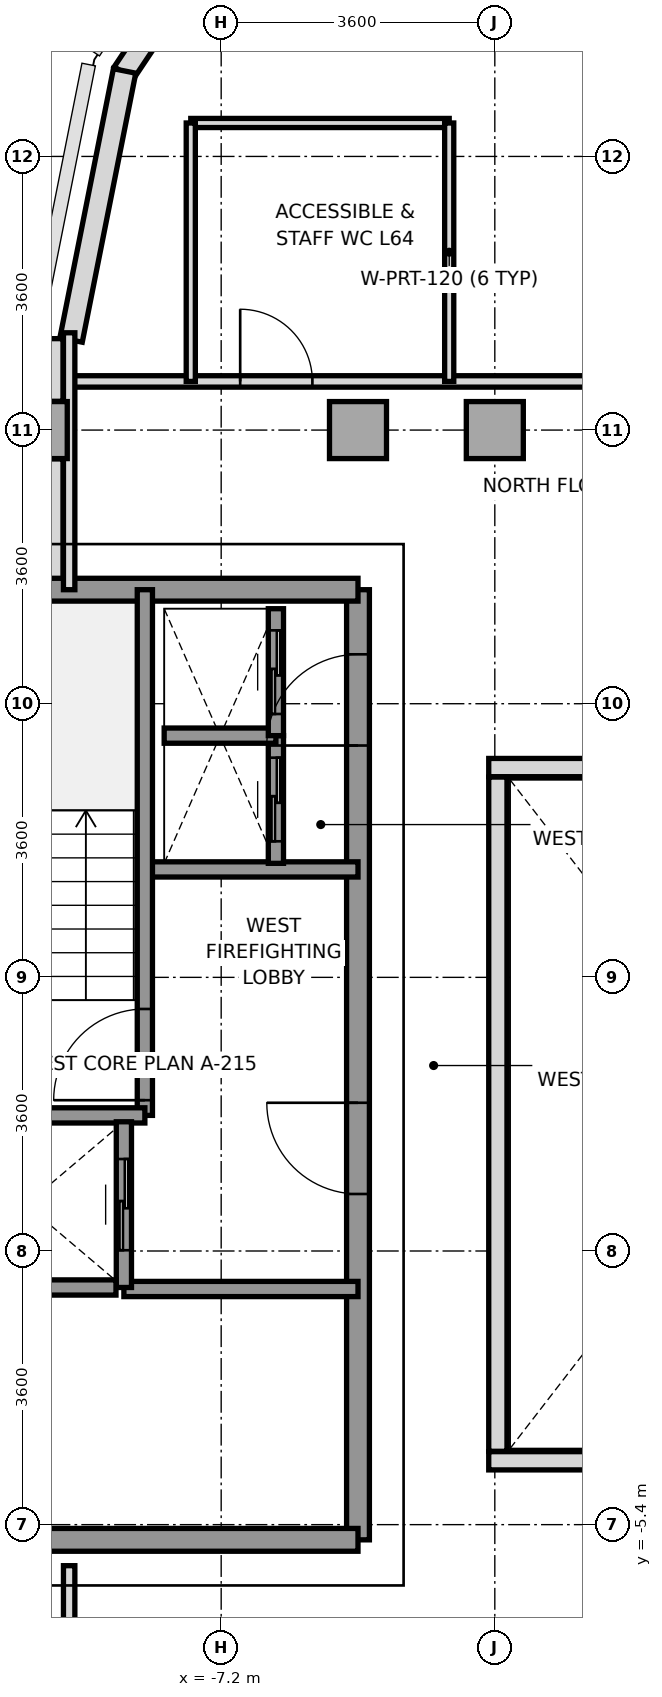
"""IFC4 building model, lengths in metres.
Left out: names, types, materials, properties, quantities, classifications, styles, units other than length and angle.
Written with IfcOpenShell. Run it as: python <this file> out.ifc"""

import sys

from ifc_helpers import new_model, si_unit, direction, frame, frame_2d, origin, origin_2d, place, context, subcontext, project, spatial, rectangle, extrude, source, transform, mapped, element, fill, save


model = new_model("IFC4")
c1 = context("Model", 3, precision=1e-05, world=origin(), true_north=direction((0.0, 1.0)))
c2 = subcontext(c1, "Body", "Model", "MODEL_VIEW")
j1 = project(units=[si_unit("LENGTHUNIT", "METRE"), si_unit("PLANEANGLEUNIT", "RADIAN")], contexts=[c1])
p1 = place(None, origin())
s1 = spatial("IfcSite", under=j1, at=p1, CompositionType="ELEMENT")
p2 = place(p1, origin())
s2 = spatial("IfcBuilding", under=s1, at=p2, CompositionType="ELEMENT")
p3 = place(p2, frame((0.0, 0.0, 233.2)))
s3 = spatial("IfcBuildingStorey", under=s2, at=p3, CompositionType="ELEMENT", Elevation=233.2)
m1 = source(origin(), c2, "Body", "SweptSolid", [
    extrude(rectangle(XDim=0.75, YDim=0.75, at=origin_2d()), origin(), (0.0, 0.0, 1.0), 3.01),
])
for number, where, z_axis, x_axis in (
    (1, (-9.6, 9.0, 0.0), (0.0, 0.0, 1.0), (1.0, 0.0, 0.0)),
    (2, (-5.4, 9.0, 0.0), (0.0, 0.0, 1.0), (1.0, 0.0, 0.0)),
    (3, (-3.6, 9.0, 0.0), (0.0, 0.0, 1.0), (1.0, 0.0, 0.0)),
):
    element("IfcColumn", number, at=place(p3, frame(where, z_axis=z_axis, x_axis=x_axis)), inside=s3, PredefinedType="COLUMN", context=c2, shape_type="MappedRepresentation", body=[
        mapped(m1, transform((0.0, 0.0, 0.0), x_axis=(1.0, 0.0, 0.0), y_axis=(0.0, 1.0, 0.0), z_axis=(0.0, 0.0, 1.0), scale=1.0)),
    ])
p4 = place(p3, frame((-7.305, 15.458, 0.0), z_axis=(0.0, 0.0, 1.0), x_axis=(-0.555604299396, -0.831446848868, 0.0)))
e4 = element("IfcWall", 4, at=p4, inside=s3, PredefinedType="SOLIDWALL", context=c2, shape_type="SweptSolid", body=[
    extrude(rectangle(XDim=2.118, YDim=0.3, at=frame_2d((1.059, 0.0))), origin(), (0.0, 0.0, 1.0), 2.61),
])
p5 = place(p3, frame((-8.471, 13.725, 0.0), z_axis=(0.0, 0.0, 1.0), x_axis=(-0.195114232679, -0.980780523974, 0.0)))
e5 = element("IfcWall", 5, at=p5, inside=s3, PredefinedType="SOLIDWALL", context=c2, shape_type="SweptSolid", body=[
    extrude(rectangle(XDim=3.609, YDim=0.3, at=frame_2d((1.804, 0.0))), origin(), (0.0, 0.0, 1.0), 3.01),
])
p6 = place(p3, frame((-9.4, 6.953, 0.0), z_axis=(0.0, 0.0, 1.0), x_axis=(0.0, 1.0, 0.0)))
e6 = element("IfcWall", 6, at=p6, inside=s3, PredefinedType="PARAPET", context=c2, shape_type="SweptSolid", body=[
    extrude(rectangle(XDim=1.669, YDim=0.24, at=frame_2d((0.834, 0.0))), origin(), (0.0, 0.0, 1.0), 1.15),
])
p7 = place(p3, frame((-9.4, 9.378, 0.0), z_axis=(0.0, 0.0, 1.0), x_axis=(0.0, 1.0, 0.0)))
e7 = element("IfcWall", 7, at=p7, inside=s3, PredefinedType="PARAPET", context=c2, shape_type="SweptSolid", body=[
    extrude(rectangle(XDim=0.825, YDim=0.24, at=frame_2d((0.413, 0.0))), origin(), (0.0, 0.0, 1.0), 1.15),
])
p8 = place(p3, frame((-5.4, -5.6, 0.0), z_axis=(0.0, 0.0, 1.0), x_axis=(0.0, 1.0, 0.0)))
e8 = element("IfcWall", 8, at=p8, inside=s3, PredefinedType="SHEAR", context=c2, shape_type="SweptSolid", body=[
    extrude(rectangle(XDim=12.5, YDim=0.3, at=frame_2d((6.25, 0.0))), origin(), (0.0, 0.0, 1.0), 3.01),
])
p9 = place(p8, frame((4.55, 0.0, 0.0)))
e9 = element("IfcOpeningElement", 9, at=p9, cuts=e8, PredefinedType="OPENING", context=c2, shape_type="SweptSolid", body=[
    extrude(rectangle(XDim=1.2, YDim=2.2, at=frame_2d((0.6, 1.1))), frame((0.0, 0.16, 0.0), z_axis=(0.0, -1.0, 0.0), x_axis=(1.0, 0.0, 0.0)), (0.0, 0.0, 1.0), 0.32),
])
p10 = place(p8, frame((10.45, 0.0, 0.0)))
e10 = element("IfcOpeningElement", 10, at=p10, cuts=e8, PredefinedType="OPENING", context=c2, shape_type="SweptSolid", body=[
    extrude(rectangle(XDim=1.2, YDim=2.2, at=frame_2d((0.6, 1.1))), frame((0.0, 0.16, 0.0), z_axis=(0.0, -1.0, 0.0), x_axis=(1.0, 0.0, 0.0)), (0.0, 0.0, 1.0), 0.32),
])
p11 = place(p3, frame((-11.356, 6.9, 0.0), z_axis=(0.0, 0.0, 1.0), x_axis=(1.0, 0.0, 0.0)))
e11 = element("IfcWall", 11, at=p11, inside=s3, PredefinedType="SHEAR", context=c2, shape_type="SweptSolid", body=[
    extrude(rectangle(XDim=5.956, YDim=0.3, at=frame_2d((2.978, 0.0))), origin(), (0.0, 0.0, 1.0), 3.01),
])
p12 = place(p3, frame((-13.2, -5.6, 0.0), z_axis=(0.0, 0.0, 1.0), x_axis=(1.0, 0.0, 0.0)))
e12 = element("IfcWall", 12, at=p12, inside=s3, PredefinedType="SHEAR", context=c2, shape_type="SweptSolid", body=[
    extrude(rectangle(XDim=7.8, YDim=0.3, at=frame_2d((3.9, 0.0))), origin(), (0.0, 0.0, 1.0), 3.01),
])
p13 = place(p3, frame((-8.18, 3.22, 0.0), z_axis=(0.0, 0.0, 1.0), x_axis=(1.0, 0.0, 0.0)))
e13 = element("IfcWall", 13, at=p13, inside=s3, PredefinedType="SOLIDWALL", context=c2, shape_type="SweptSolid", body=[
    extrude(rectangle(XDim=2.78, YDim=0.2, at=frame_2d((1.39, 0.0))), origin(), (0.0, 0.0, 1.0), 3.01),
])
p14 = place(p3, frame((-8.48, -2.3, 0.0), z_axis=(0.0, 0.0, 1.0), x_axis=(1.0, 0.0, 0.0)))
e14 = element("IfcWall", 14, at=p14, inside=s3, PredefinedType="SOLIDWALL", context=c2, shape_type="SweptSolid", body=[
    extrude(rectangle(XDim=3.08, YDim=0.2, at=frame_2d((1.54, 0.0))), origin(), (0.0, 0.0, 1.0), 3.01),
])
p15 = place(p3, frame((-8.204, -0.016, 0.0), z_axis=(0.0, 0.0, 1.0), x_axis=(0.0, 1.0, 0.0)))
e15 = element("IfcWall", 15, at=p15, inside=s3, PredefinedType="SOLIDWALL", context=c2, shape_type="SweptSolid", body=[
    extrude(rectangle(XDim=6.916, YDim=0.2, at=frame_2d((3.458, 0.0))), origin(), (0.0, 0.0, 1.0), 3.01),
])
p16 = place(p15, frame((0.2, 0.0, 0.0)))
e16 = element("IfcOpeningElement", 16, at=p16, cuts=e15, PredefinedType="OPENING", context=c2, shape_type="SweptSolid", body=[
    extrude(rectangle(XDim=1.2, YDim=2.2, at=frame_2d((0.6, 1.1))), frame((0.0, 0.11, 0.0), z_axis=(0.0, -1.0, 0.0), x_axis=(1.0, 0.0, 0.0)), (0.0, 0.0, 1.0), 0.22),
])
p17 = place(p3, frame((-11.356, -0.016, 0.0), z_axis=(0.0, 0.0, 1.0), x_axis=(1.0, 0.0, 0.0)))
e17 = element("IfcWall", 17, at=p17, inside=s3, PredefinedType="SOLIDWALL", context=c2, shape_type="SweptSolid", body=[
    extrude(rectangle(XDim=3.152, YDim=0.2, at=frame_2d((1.576, 0.0))), origin(), (0.0, 0.0, 1.0), 3.01),
])
p18 = place(p3, frame((-8.48, -2.28, 0.0), z_axis=(0.0, 0.0, 1.0), x_axis=(0.0, 1.0, 0.0)))
e18 = element("IfcWall", 18, at=p18, inside=s3, PredefinedType="SOLIDWALL", context=c2, shape_type="SweptSolid", body=[
    extrude(rectangle(XDim=2.18, YDim=0.2, at=frame_2d((1.09, 0.0))), origin(), (0.0, 0.0, 1.0), 3.01),
])
p19 = place(p18, frame((0.49, 0.0, 0.0)))
e19 = element("IfcOpeningElement", 19, at=p19, cuts=e18, PredefinedType="OPENING", context=c2, shape_type="SweptSolid", body=[
    extrude(rectangle(XDim=1.2, YDim=2.2, at=frame_2d((0.6, 1.1))), frame((0.0, 0.11, 0.0), z_axis=(0.0, -1.0, 0.0), x_axis=(1.0, 0.0, 0.0)), (0.0, 0.0, 1.0), 0.22),
])
p20 = place(p3, frame((-10.946, -2.28, 0.0), z_axis=(0.0, 0.0, 1.0), x_axis=(1.0, 0.0, 0.0)))
e20 = element("IfcWall", 20, at=p20, inside=s3, PredefinedType="SOLIDWALL", context=c2, shape_type="SweptSolid", body=[
    extrude(rectangle(XDim=2.362, YDim=0.2, at=frame_2d((1.181, 0.0))), origin(), (0.0, 0.0, 1.0), 3.01),
])
p21 = place(p3, frame((-6.48, 3.3, 0.0), z_axis=(0.0, 0.0, 1.0), x_axis=(0.0, 1.0, 0.0)))
e21 = element("IfcWall", 21, at=p21, inside=s3, PredefinedType="SOLIDWALL", context=c2, shape_type="SweptSolid", body=[
    extrude(rectangle(XDim=1.68, YDim=0.2, at=frame_2d((0.84, 0.0))), origin(), (0.0, 0.0, 1.0), 3.01),
])
p22 = place(p21, frame((0.29, 0.0, 0.0)))
e22 = element("IfcOpeningElement", 22, at=p22, cuts=e21, PredefinedType="OPENING", context=c2, shape_type="SweptSolid", body=[
    extrude(rectangle(XDim=1.1, YDim=2.2, at=frame_2d((0.55, 1.1))), frame((0.0, 0.11, 0.0), z_axis=(0.0, -1.0, 0.0), x_axis=(1.0, 0.0, 0.0)), (0.0, 0.0, 1.0), 0.22),
])
p23 = place(p3, frame((-7.95, 4.98, 0.0), z_axis=(0.0, 0.0, 1.0), x_axis=(1.0, 0.0, 0.0)))
e23 = element("IfcWall", 23, at=p23, inside=s3, PredefinedType="SOLIDWALL", context=c2, shape_type="SweptSolid", body=[
    extrude(rectangle(XDim=1.47, YDim=0.2, at=frame_2d((0.735, 0.0))), origin(), (0.0, 0.0, 1.0), 3.01),
])
p24 = place(p3, frame((-6.48, 4.98, 0.0), z_axis=(0.0, 0.0, 1.0), x_axis=(0.0, 1.0, 0.0)))
e24 = element("IfcWall", 24, at=p24, inside=s3, PredefinedType="SOLIDWALL", context=c2, shape_type="SweptSolid", body=[
    extrude(rectangle(XDim=1.67, YDim=0.2, at=frame_2d((0.835, 0.0))), origin(), (0.0, 0.0, 1.0), 3.01),
])
p25 = place(p24, frame((0.285, 0.0, 0.0)))
e25 = element("IfcOpeningElement", 25, at=p25, cuts=e24, PredefinedType="OPENING", context=c2, shape_type="SweptSolid", body=[
    extrude(rectangle(XDim=1.1, YDim=2.2, at=frame_2d((0.55, 1.1))), frame((0.0, 0.11, 0.0), z_axis=(0.0, -1.0, 0.0), x_axis=(1.0, 0.0, 0.0)), (0.0, 0.0, 1.0), 0.22),
])
p26 = place(p3, frame((-9.2, 9.64, 0.0), z_axis=(0.0, 0.0, 1.0), x_axis=(1.0, 0.0, 0.0)))
e26 = element("IfcWall", 26, at=p26, inside=s3, PredefinedType="PARTITIONING", context=c2, shape_type="SweptSolid", body=[
    extrude(rectangle(XDim=18.4, YDim=0.15, at=frame_2d((9.2, 0.0))), origin(), (0.0, 0.0, 1.0), 3.01),
])
p27 = place(p26, frame((2.25, 0.0, 0.0)))
e27 = element("IfcOpeningElement", 27, at=p27, cuts=e26, PredefinedType="OPENING", context=c2, shape_type="SweptSolid", body=[
    extrude(rectangle(XDim=0.95, YDim=2.15, at=frame_2d((0.475, 1.075))), frame((0.0, 0.085, 0.0), z_axis=(0.0, -1.0, 0.0), x_axis=(1.0, 0.0, 0.0)), (0.0, 0.0, 1.0), 0.17),
])
p28 = place(p26, frame((9.8, 0.0, 0.0)))
e28 = element("IfcOpeningElement", 28, at=p28, cuts=e26, PredefinedType="OPENING", context=c2, shape_type="SweptSolid", body=[
    extrude(rectangle(XDim=1.1, YDim=2.2, at=frame_2d((0.55, 1.1))), frame((0.0, 0.085, 0.0), z_axis=(0.0, -1.0, 0.0), x_axis=(1.0, 0.0, 0.0)), (0.0, 0.0, 1.0), 0.17),
])
p29 = place(p26, frame((15.15, 0.0, 0.0)))
e29 = element("IfcOpeningElement", 29, at=p29, cuts=e26, PredefinedType="OPENING", context=c2, shape_type="SweptSolid", body=[
    extrude(rectangle(XDim=0.95, YDim=2.15, at=frame_2d((0.475, 1.075))), frame((0.0, 0.085, 0.0), z_axis=(0.0, -1.0, 0.0), x_axis=(1.0, 0.0, 0.0)), (0.0, 0.0, 1.0), 0.17),
])
p30 = place(p3, frame((-9.2, 6.9, 0.0), z_axis=(0.0, 0.0, 1.0), x_axis=(0.0, 1.0, 0.0)))
e30 = element("IfcWall", 30, at=p30, inside=s3, PredefinedType="PARTITIONING", context=c2, shape_type="SweptSolid", body=[
    extrude(rectangle(XDim=3.38, YDim=0.15, at=frame_2d((1.69, 0.0))), origin(), (0.0, 0.0, 1.0), 2.61),
])
for number, where, z_axis, x_axis in (
    (31, (-7.6, 13.04, 0.0), (0.0, 0.0, 1.0), (1.0, 0.0, 0.0)),
    (32, (-7.6, 9.64, 0.0), (0.0, 0.0, 1.0), (0.0, 1.0, 0.0)),
    (33, (-4.2, 9.64, 0.0), (0.0, 0.0, 1.0), (0.0, 1.0, 0.0)),
):
    element("IfcWall", number, at=place(p3, frame(where, z_axis=z_axis, x_axis=x_axis)), inside=s3, PredefinedType="PARTITIONING", context=c2, shape_type="SweptSolid", body=[
        extrude(rectangle(XDim=3.4, YDim=0.12, at=frame_2d((1.7, 0.0))), origin(), (0.0, 0.0, 1.0), 3.01),
    ])
p31 = place(p3, frame((-9.2, -10.28, 0.0), z_axis=(0.0, 0.0, 1.0), x_axis=(0.0, 1.0, 0.0)))
e34 = element("IfcWall", 34, at=p31, inside=s3, PredefinedType="PARTITIONING", context=c2, shape_type="SweptSolid", body=[
    extrude(rectangle(XDim=4.34, YDim=0.15, at=frame_2d((2.17, 0.0))), origin(), (0.0, 0.0, 1.0), 2.61),
])
for number, where, z_axis, x_axis in (
    (35, (-3.68, -4.56, 0.0), (0.0, 0.0, 1.0), (1.0, 0.0, 0.0)),
    (36, (-3.68, 4.56, 0.0), (0.0, 0.0, 1.0), (1.0, 0.0, 0.0)),
):
    element("IfcWall", number, at=place(p3, frame(where, z_axis=z_axis, x_axis=x_axis)), inside=s3, PredefinedType="PARAPET", context=c2, shape_type="SweptSolid", body=[
        extrude(rectangle(XDim=7.36, YDim=0.24, at=frame_2d((3.68, 0.0))), origin(), (0.0, 0.0, 1.0), 1.15),
    ])
p32 = place(p3, frame((-3.56, -4.435, 0.0), z_axis=(0.0, 0.0, 1.0), x_axis=(0.0, 1.0, 0.0)))
e37 = element("IfcWall", 37, at=p32, inside=s3, PredefinedType="PARAPET", context=c2, shape_type="SweptSolid", body=[
    extrude(rectangle(XDim=8.87, YDim=0.24, at=frame_2d((4.435, 0.0))), origin(), (0.0, 0.0, 1.0), 1.15),
])
m2 = source(origin(), c2, "Body", "SweptSolid", [
    extrude(rectangle(XDim=1.2, YDim=2.2, at=frame_2d((0.6, 1.1))), frame((0.0, 0.025, 0.0), z_axis=(0.0, -1.0, 0.0), x_axis=(1.0, 0.0, 0.0)), (0.0, 0.0, 1.0), 0.05),
])
p33 = place(p16, origin())
e38 = element("IfcDoor", 38, at=p33, inside=s3, OperationType="SINGLE_SWING_LEFT", PredefinedType="DOOR", context=c2, shape_type="MappedRepresentation", body=[
    mapped(m2, transform((0.0, 0.0, 0.0), x_axis=(1.0, 0.0, 0.0), y_axis=(0.0, 1.0, 0.0), z_axis=(0.0, 0.0, 1.0), scale=1.0)),
])
fill(e16, e38)
p34 = place(p9, origin())
e39 = element("IfcDoor", 39, at=p34, inside=s3, OperationType="SINGLE_SWING_RIGHT", PredefinedType="DOOR", context=c2, shape_type="MappedRepresentation", body=[
    mapped(m2, transform((0.0, 0.0, 0.0), x_axis=(1.0, 0.0, 0.0), y_axis=(0.0, 1.0, 0.0), z_axis=(0.0, 0.0, 1.0), scale=1.0)),
])
fill(e9, e39)
p35 = place(p10, origin())
e40 = element("IfcDoor", 40, at=p35, inside=s3, OperationType="SINGLE_SWING_LEFT", PredefinedType="DOOR", context=c2, shape_type="MappedRepresentation", body=[
    mapped(m2, transform((0.0, 0.0, 0.0), x_axis=(1.0, 0.0, 0.0), y_axis=(0.0, 1.0, 0.0), z_axis=(0.0, 0.0, 1.0), scale=1.0)),
])
fill(e10, e40)
p36 = place(p19, origin())
e41 = element("IfcDoor", 41, at=p36, inside=s3, OperationType="SLIDING_TO_RIGHT", PredefinedType="DOOR", context=c2, shape_type="MappedRepresentation", body=[
    mapped(m2, transform((0.0, 0.0, 0.0), x_axis=(1.0, 0.0, 0.0), y_axis=(0.0, 1.0, 0.0), z_axis=(0.0, 0.0, 1.0), scale=1.0)),
])
fill(e19, e41)
m3 = source(origin(), c2, "Body", "SweptSolid", [
    extrude(rectangle(XDim=1.1, YDim=2.2, at=frame_2d((0.55, 1.1))), frame((0.0, 0.025, 0.0), z_axis=(0.0, -1.0, 0.0), x_axis=(1.0, 0.0, 0.0)), (0.0, 0.0, 1.0), 0.05),
])
p37 = place(p22, origin())
e42 = element("IfcDoor", 42, at=p37, inside=s3, OperationType="SLIDING_TO_LEFT", PredefinedType="DOOR", context=c2, shape_type="MappedRepresentation", body=[
    mapped(m3, transform((0.0, 0.0, 0.0), x_axis=(1.0, 0.0, 0.0), y_axis=(0.0, 1.0, 0.0), z_axis=(0.0, 0.0, 1.0), scale=1.0)),
])
fill(e22, e42)
p38 = place(p25, origin())
e43 = element("IfcDoor", 43, at=p38, inside=s3, OperationType="SLIDING_TO_LEFT", PredefinedType="DOOR", context=c2, shape_type="MappedRepresentation", body=[
    mapped(m3, transform((0.0, 0.0, 0.0), x_axis=(1.0, 0.0, 0.0), y_axis=(0.0, 1.0, 0.0), z_axis=(0.0, 0.0, 1.0), scale=1.0)),
])
fill(e25, e43)
m4 = source(origin(), c2, "Body", "SweptSolid", [
    extrude(rectangle(XDim=0.95, YDim=2.15, at=frame_2d((0.475, 1.075))), frame((0.0, 0.025, 0.0), z_axis=(0.0, -1.0, 0.0), x_axis=(1.0, 0.0, 0.0)), (0.0, 0.0, 1.0), 0.05),
])
p39 = place(p27, origin())
e44 = element("IfcDoor", 44, at=p39, inside=s3, OperationType="SINGLE_SWING_LEFT", PredefinedType="DOOR", context=c2, shape_type="MappedRepresentation", body=[
    mapped(m4, transform((0.0, 0.0, 0.0), x_axis=(1.0, 0.0, 0.0), y_axis=(0.0, 1.0, 0.0), z_axis=(0.0, 0.0, 1.0), scale=1.0)),
])
fill(e27, e44)
save(model, sys.argv[1])
